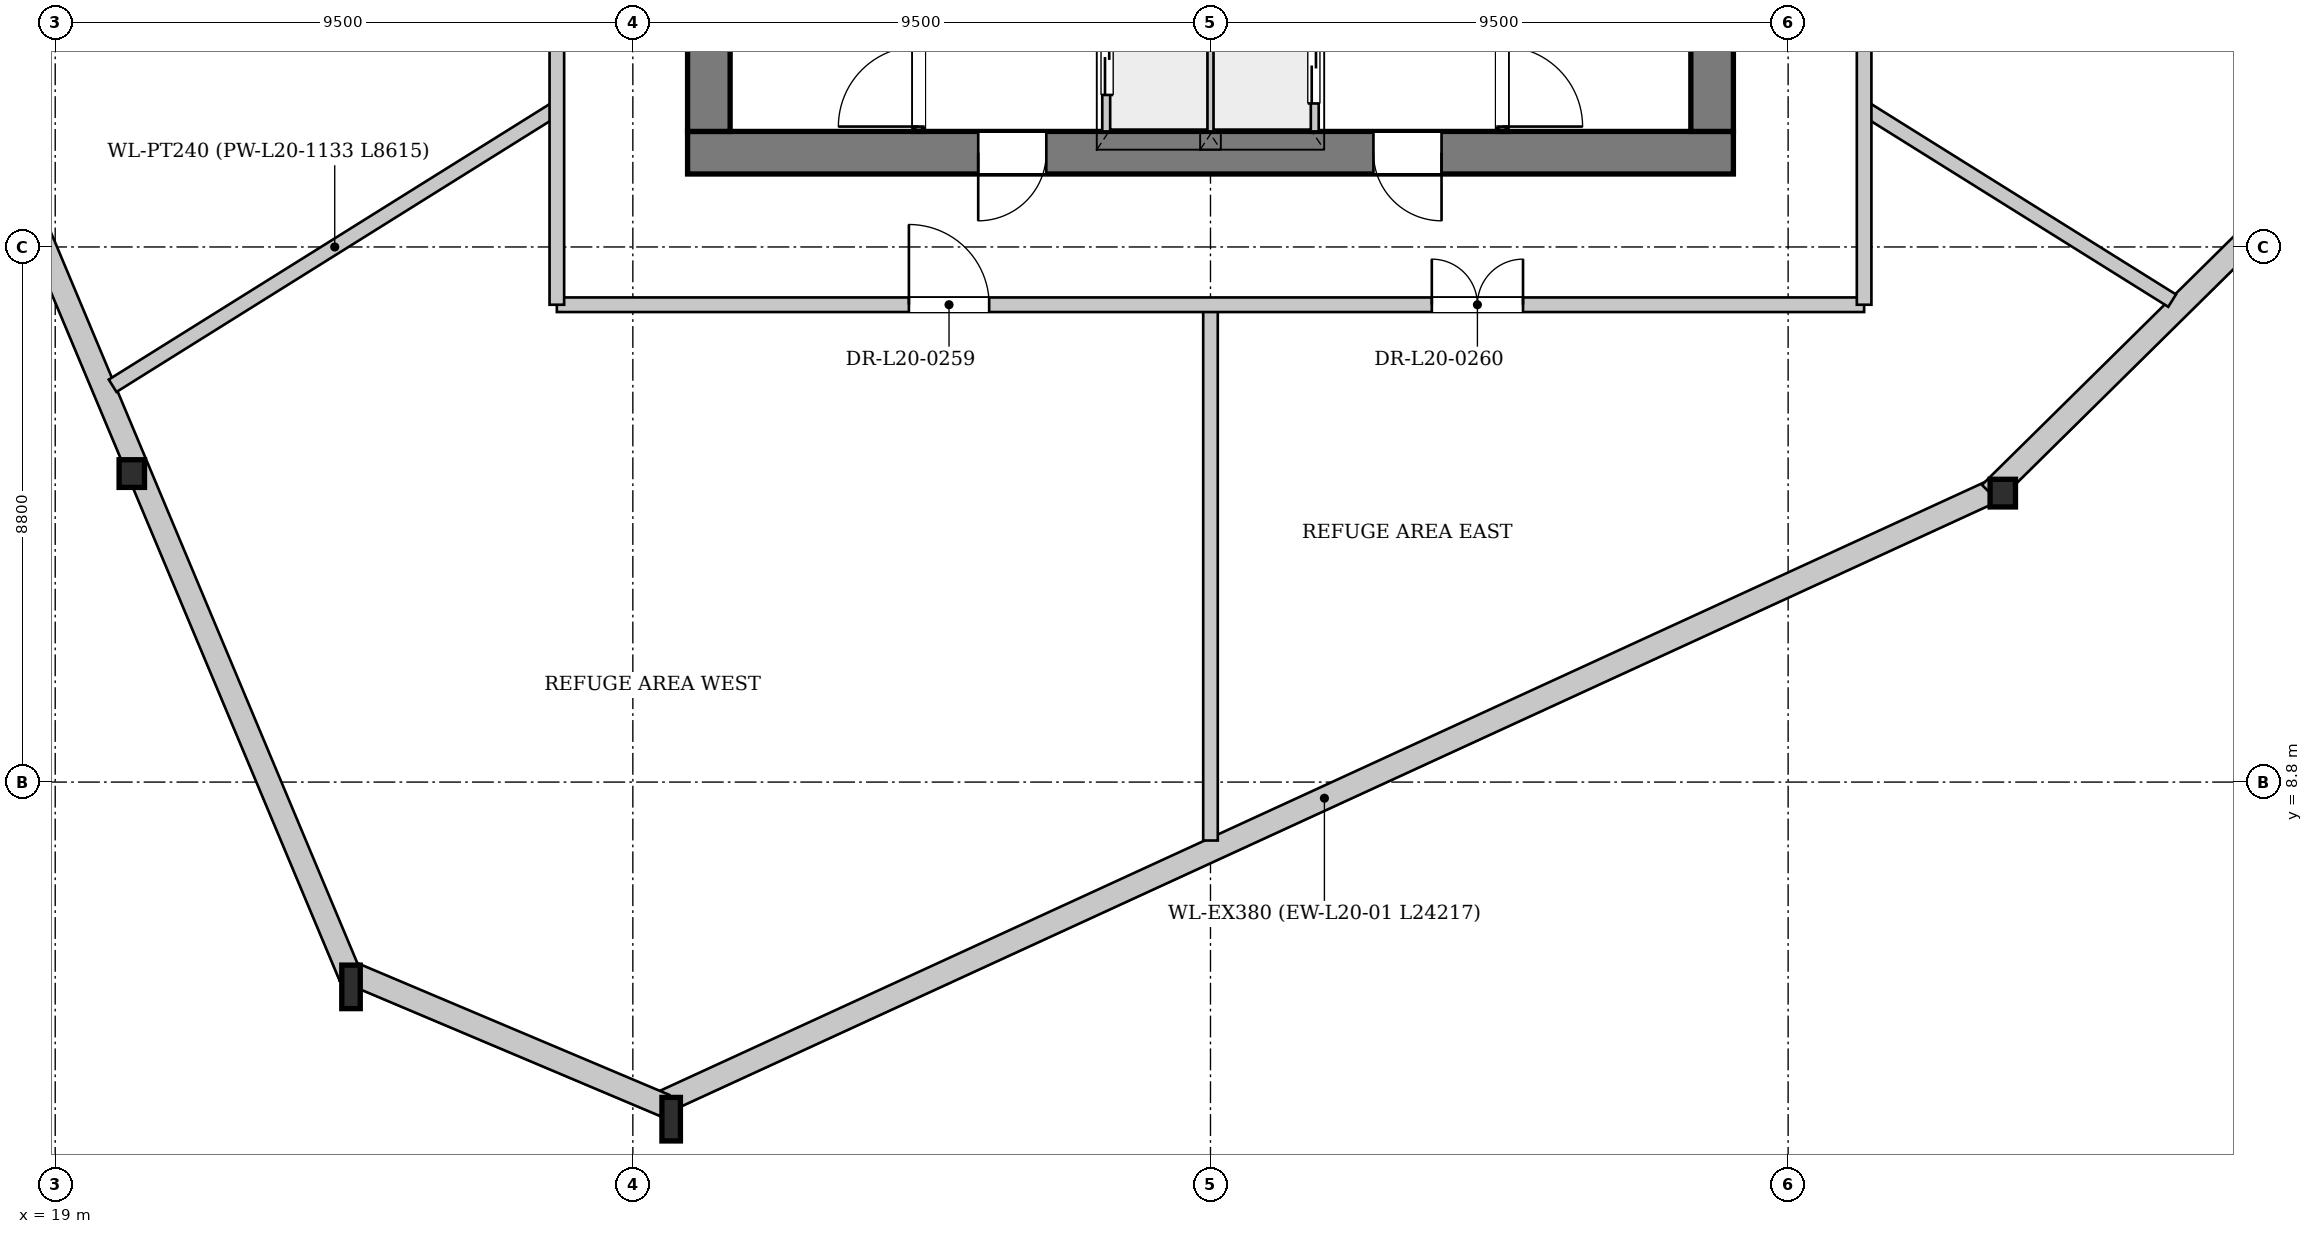
"""IFC4 building model, lengths in metres.
Left out: names, types, materials, properties, quantities, classifications, styles, units other than length and angle.
Written with IfcOpenShell. Run it as: python <this file> out.ifc"""

import sys

from ifc_helpers import new_model, si_unit, direction, frame, frame_2d, origin, origin_2d, place, context, subcontext, project, spatial, rectangle, i_section, extrude, source, transform, mapped, element, fill, save


model = new_model("IFC4")
c1 = context("Model", 3, precision=1e-05, world=origin(), true_north=direction((0.0, 1.0)))
c2 = subcontext(c1, "Body", "Model", "MODEL_VIEW")
j1 = project(units=[si_unit("LENGTHUNIT", "METRE"), si_unit("PLANEANGLEUNIT", "RADIAN")], contexts=[c1])
p1 = place(None, origin())
s1 = spatial("IfcSite", under=j1, at=p1, CompositionType="ELEMENT")
p2 = place(p1, origin())
s2 = spatial("IfcBuilding", under=s1, at=p2, CompositionType="ELEMENT")
p3 = place(p2, frame((0.0, 0.0, 79.9)))
s3 = spatial("IfcBuildingStorey", under=s2, at=p3, CompositionType="ELEMENT", Elevation=79.9)
m1 = source(origin(), c2, "Body", "SweptSolid", [
    extrude(i_section(OverallWidth=0.418, OverallDepth=0.455, WebThickness=0.038, FlangeThickness=0.059, at=origin_2d()), origin(), (0.0, 0.0, 1.0), 4.351),
])
p4 = place(p3, frame((20.126, 14.004, 0.0), z_axis=(0.061270817666, -0.059868097481, 0.996324092756), x_axis=(0.698872032261, 0.715246728425, 0.0)))
e1 = element("IfcColumn", 1, at=p4, inside=s3, PredefinedType="COLUMN", context=c2, shape_type="MappedRepresentation", body=[
    mapped(m1, transform((0.0, 0.0, 0.0), x_axis=(1.0, 0.0, 0.0), y_axis=(0.0, 1.0, 0.0), z_axis=(0.0, 0.0, 1.0), scale=1.0)),
])
m2 = source(origin(), c2, "Body", "SweptSolid", [
    extrude(i_section(OverallWidth=0.304, OverallDepth=0.716, WebThickness=0.021, FlangeThickness=0.04, at=origin_2d()), origin(), (0.0, 0.0, 1.0), 4.356),
])
p5 = place(p3, frame((23.678, 5.534, 0.0), z_axis=(0.085807381711, -0.046630791367, 0.995219906624), x_axis=(0.477484426277, 0.878640212296, 0.0)))
e2 = element("IfcColumn", 2, at=p5, inside=s3, PredefinedType="COLUMN", context=c2, shape_type="MappedRepresentation", body=[
    mapped(m2, transform((0.0, 0.0, 0.0), x_axis=(1.0, 0.0, 0.0), y_axis=(0.0, 1.0, 0.0), z_axis=(0.0, 0.0, 1.0), scale=1.0)),
])
m3 = source(origin(), c2, "Body", "SweptSolid", [
    extrude(i_section(OverallWidth=0.304, OverallDepth=0.716, WebThickness=0.021, FlangeThickness=0.04, at=origin_2d()), origin(), (0.0, 0.0, 1.0), 4.351),
])
p6 = place(p3, frame((28.95, 3.307, 0.0), z_axis=(0.082869842414, -0.023228242897, 0.996289635573), x_axis=(0.269895907344, 0.962889505187, 0.0)))
e3 = element("IfcColumn", 3, at=p6, inside=s3, PredefinedType="COLUMN", context=c2, shape_type="MappedRepresentation", body=[
    mapped(m3, transform((0.0, 0.0, 0.0), x_axis=(1.0, 0.0, 0.0), y_axis=(0.0, 1.0, 0.0), z_axis=(0.0, 0.0, 1.0), scale=1.0)),
])
m4 = source(origin(), c2, "Body", "SweptSolid", [
    extrude(i_section(OverallWidth=0.418, OverallDepth=0.455, WebThickness=0.038, FlangeThickness=0.059, at=origin_2d()), origin(), (0.0, 0.0, 1.0), 4.346),
])
p7 = place(p3, frame((50.956, 13.417, 0.0), z_axis=(0.034378288577, 0.062128083604, 0.997475931791), x_axis=(-0.874976999034, 0.484164487712, 0.0)))
e4 = element("IfcColumn", 4, at=p7, inside=s3, PredefinedType="COLUMN", context=c2, shape_type="MappedRepresentation", body=[
    mapped(m4, transform((0.0, 0.0, 0.0), x_axis=(1.0, 0.0, 0.0), y_axis=(0.0, 1.0, 0.0), z_axis=(0.0, 0.0, 1.0), scale=1.0)),
])
p8 = place(p3, frame((50.876, 13.59, 0.0), z_axis=(0.0, 0.0, 1.0), x_axis=(-0.908687697163, -0.417476549072, 0.0)))
e5 = element("IfcWall", 5, at=p8, inside=s3, PredefinedType="SOLIDWALL", context=c2, shape_type="SweptSolid", body=[
    extrude(rectangle(XDim=24.217, YDim=0.38, at=frame_2d((12.109, 0.0))), origin(), (0.0, 0.0, 1.0), 3.642),
])
p9 = place(p3, frame((29.024, 3.482, 0.0), z_axis=(0.0, 0.0, 1.0), x_axis=(-0.921180248129, 0.389136159277, 0.0)))
e6 = element("IfcWall", 6, at=p9, inside=s3, PredefinedType="SOLIDWALL", context=c2, shape_type="SweptSolid", body=[
    extrude(rectangle(XDim=5.723, YDim=0.38, at=frame_2d((2.862, 0.0))), origin(), (0.0, 0.0, 1.0), 3.642),
])
p10 = place(p3, frame((23.853, 5.607, 0.0), z_axis=(0.0, 0.0, 1.0), x_axis=(-0.386717925578, 0.922198051417, 0.0)))
e7 = element("IfcWall", 7, at=p10, inside=s3, PredefinedType="SOLIDWALL", context=c2, shape_type="SweptSolid", body=[
    extrude(rectangle(XDim=18.369, YDim=0.38, at=frame_2d((9.185, 0.0))), origin(), (0.0, 0.0, 1.0), 3.642),
])
p11 = place(p3, frame((68.059, 30.563, 0.0), z_axis=(0.0, 0.0, 1.0), x_axis=(-0.711738982303, -0.70244403412, 0.0)))
e8 = element("IfcWall", 8, at=p11, inside=s3, PredefinedType="SOLIDWALL", context=c2, shape_type="SweptSolid", body=[
    extrude(rectangle(XDim=24.217, YDim=0.38, at=frame_2d((12.109, 0.0))), origin(), (0.0, 0.0, 1.0), 3.642),
])
p12 = place(p3, frame((46.6, 19.15, 0.0), z_axis=(0.0, 0.0, 1.0), x_axis=(-1.0, 0.0, 0.0)))
e9 = element("IfcWall", 9, at=p12, inside=s3, PredefinedType="SHEAR", context=c2, shape_type="SweptSolid", body=[
    extrude(rectangle(XDim=17.2, YDim=0.7, at=frame_2d((8.6, 0.0))), origin(), (0.0, 0.0, 1.0), 4.25),
])
p13 = place(p12, frame((4.8, 0.0, 0.0)))
e10 = element("IfcOpeningElement", 10, at=p13, cuts=e9, PredefinedType="OPENING", context=c2, shape_type="SweptSolid", body=[
    extrude(rectangle(XDim=1.12, YDim=2.25, at=frame_2d((0.56, 1.125))), frame((0.0, 0.36, 0.0), z_axis=(0.0, -1.0, 0.0), x_axis=(1.0, 0.0, 0.0)), (0.0, 0.0, 1.0), 0.72),
])
p14 = place(p12, frame((11.3, 0.0, 0.0)))
e11 = element("IfcOpeningElement", 11, at=p14, cuts=e9, PredefinedType="OPENING", context=c2, shape_type="SweptSolid", body=[
    extrude(rectangle(XDim=1.12, YDim=2.25, at=frame_2d((0.56, 1.125))), frame((0.0, 0.36, 0.0), z_axis=(0.0, -1.0, 0.0), x_axis=(1.0, 0.0, 0.0)), (0.0, 0.0, 1.0), 0.72),
])
p15 = place(p3, frame((29.75, 19.5, 0.0), z_axis=(0.0, 0.0, 1.0), x_axis=(0.0, 1.0, 0.0)))
e12 = element("IfcWall", 12, at=p15, inside=s3, PredefinedType="SHEAR", context=c2, shape_type="SweptSolid", body=[
    extrude(rectangle(XDim=14.2, YDim=0.7, at=frame_2d((7.1, 0.0))), origin(), (0.0, 0.0, 1.0), 4.25),
])
p16 = place(p15, frame((7.42, 0.0, 0.0)))
e13 = element("IfcOpeningElement", 13, at=p16, cuts=e12, PredefinedType="OPENING", context=c2, shape_type="SweptSolid", body=[
    extrude(rectangle(XDim=1.6, YDim=2.2, at=frame_2d((0.8, 1.1))), frame((0.0, 0.36, 0.0), z_axis=(0.0, -1.0, 0.0), x_axis=(1.0, 0.0, 0.0)), (0.0, 0.0, 1.0), 0.72),
])
p17 = place(p3, frame((46.25, 33.7, 0.0), z_axis=(0.0, 0.0, 1.0), x_axis=(0.0, -1.0, 0.0)))
e14 = element("IfcWall", 14, at=p17, inside=s3, PredefinedType="SHEAR", context=c2, shape_type="SweptSolid", body=[
    extrude(rectangle(XDim=14.2, YDim=0.7, at=frame_2d((7.1, 0.0))), origin(), (0.0, 0.0, 1.0), 4.25),
])
p18 = place(p17, frame((5.18, 0.0, 0.0)))
e15 = element("IfcOpeningElement", 15, at=p18, cuts=e14, PredefinedType="OPENING", context=c2, shape_type="SweptSolid", body=[
    extrude(rectangle(XDim=1.6, YDim=2.2, at=frame_2d((0.8, 1.1))), frame((0.0, 0.36, 0.0), z_axis=(0.0, -1.0, 0.0), x_axis=(1.0, 0.0, 0.0)), (0.0, 0.0, 1.0), 0.72),
])
p19 = place(p3, frame((33.2, 19.5, 0.0), z_axis=(0.0, 0.0, 1.0), x_axis=(0.0, 1.0, 0.0)))
e16 = element("IfcWall", 16, at=p19, inside=s3, PredefinedType="PARTITIONING", context=c2, shape_type="SweptSolid", body=[
    extrude(rectangle(XDim=7.46, YDim=0.16, at=frame_2d((3.73, 0.0))), origin(), (0.0, 0.0, 1.0), 4.25),
])
p20 = place(p19, frame((0.08, 0.0, 0.0)))
e17 = element("IfcOpeningElement", 17, at=p20, cuts=e16, PredefinedType="OPENING", context=c2, shape_type="SweptSolid", body=[
    extrude(rectangle(XDim=1.32, YDim=2.2, at=frame_2d((0.66, 1.1))), frame((0.0, 0.09, 0.0), z_axis=(0.0, -1.0, 0.0), x_axis=(1.0, 0.0, 0.0)), (0.0, 0.0, 1.0), 0.18),
])
p21 = place(p3, frame((42.8, 26.96, 0.0), z_axis=(0.0, 0.0, 1.0), x_axis=(0.0, -1.0, 0.0)))
e18 = element("IfcWall", 18, at=p21, inside=s3, PredefinedType="PARTITIONING", context=c2, shape_type="SweptSolid", body=[
    extrude(rectangle(XDim=7.46, YDim=0.16, at=frame_2d((3.73, 0.0))), origin(), (0.0, 0.0, 1.0), 4.25),
])
p22 = place(p21, frame((6.06, 0.0, 0.0)))
e19 = element("IfcOpeningElement", 19, at=p22, cuts=e18, PredefinedType="OPENING", context=c2, shape_type="SweptSolid", body=[
    extrude(rectangle(XDim=1.32, YDim=2.2, at=frame_2d((0.66, 1.1))), frame((0.0, 0.09, 0.0), z_axis=(0.0, -1.0, 0.0), x_axis=(1.0, 0.0, 0.0)), (0.0, 0.0, 1.0), 0.18),
])
p23 = place(p3, frame((36.3, 19.5, 0.0), z_axis=(0.0, 0.0, 1.0), x_axis=(0.0, 1.0, 0.0)))
e20 = element("IfcWall", 20, at=p23, inside=s3, PredefinedType="PARTITIONING", context=c2, shape_type="SweptSolid", body=[
    extrude(rectangle(XDim=4.78, YDim=0.16, at=frame_2d((2.39, 0.0))), origin(), (0.0, 0.0, 1.0), 4.25),
])
p24 = place(p23, frame((0.6, 0.0, 0.0)))
e21 = element("IfcOpeningElement", 21, at=p24, cuts=e20, PredefinedType="OPENING", context=c2, shape_type="SweptSolid", body=[
    extrude(rectangle(XDim=1.2, YDim=2.2, at=frame_2d((0.6, 1.1))), frame((0.0, 0.09, 0.0), z_axis=(0.0, -1.0, 0.0), x_axis=(1.0, 0.0, 0.0)), (0.0, 0.0, 1.0), 0.18),
])
p25 = place(p23, frame((2.65, 0.0, 0.0)))
e22 = element("IfcOpeningElement", 22, at=p25, cuts=e20, PredefinedType="OPENING", context=c2, shape_type="SweptSolid", body=[
    extrude(rectangle(XDim=0.95, YDim=2.1, at=frame_2d((0.475, 1.05))), frame((0.0, 0.09, 0.0), z_axis=(0.0, -1.0, 0.0), x_axis=(1.0, 0.0, 0.0)), (0.0, 0.0, 1.0), 0.18),
])
p26 = place(p3, frame((39.7, 24.28, 0.0), z_axis=(0.0, 0.0, 1.0), x_axis=(0.0, -1.0, 0.0)))
e23 = element("IfcWall", 23, at=p26, inside=s3, PredefinedType="PARTITIONING", context=c2, shape_type="SweptSolid", body=[
    extrude(rectangle(XDim=4.78, YDim=0.16, at=frame_2d((2.39, 0.0))), origin(), (0.0, 0.0, 1.0), 4.25),
])
p27 = place(p26, frame((3.12, 0.0, 0.0)))
e24 = element("IfcOpeningElement", 24, at=p27, cuts=e23, PredefinedType="OPENING", context=c2, shape_type="SweptSolid", body=[
    extrude(rectangle(XDim=1.2, YDim=2.2, at=frame_2d((0.6, 1.1))), frame((0.0, 0.09, 0.0), z_axis=(0.0, -1.0, 0.0), x_axis=(1.0, 0.0, 0.0)), (0.0, 0.0, 1.0), 0.18),
])
p28 = place(p3, frame((38.0, 19.5, 0.0), z_axis=(0.0, 0.0, 1.0), x_axis=(0.0, 1.0, 0.0)))
e25 = element("IfcWall", 25, at=p28, inside=s3, PredefinedType="PARTITIONING", context=c2, shape_type="SweptSolid", body=[
    extrude(rectangle(XDim=2.46, YDim=0.125, at=frame_2d((1.23, 0.0))), origin(), (0.0, 0.0, 1.0), 4.25),
])
p29 = place(p3, frame((27.25, 19.883, 0.0), z_axis=(0.0, 0.0, 1.0), x_axis=(-0.848038103276, -0.529935255849, 0.0)))
e26 = element("IfcWall", 26, at=p29, inside=s3, PredefinedType="PARTITIONING", context=c2, shape_type="SweptSolid", body=[
    extrude(rectangle(XDim=8.615, YDim=0.24, at=frame_2d((4.308, 0.0))), origin(), (0.0, 0.0, 1.0), 4.25),
])
p30 = place(p3, frame((38.0, 16.65, 0.0), z_axis=(0.0, 0.0, 1.0), x_axis=(0.0, -1.0, 0.0)))
e27 = element("IfcWall", 27, at=p30, inside=s3, PredefinedType="PARTITIONING", context=c2, shape_type="SweptSolid", body=[
    extrude(rectangle(XDim=8.811, YDim=0.24, at=frame_2d((4.406, 0.0))), origin(), (0.0, 0.0, 1.0), 4.25),
])
p31 = place(p3, frame((48.75, 19.883, 0.0), z_axis=(0.0, 0.0, 1.0), x_axis=(0.848037336034, -0.529936483639, 0.0)))
e28 = element("IfcWall", 28, at=p31, inside=s3, PredefinedType="PARTITIONING", context=c2, shape_type="SweptSolid", body=[
    extrude(rectangle(XDim=5.973, YDim=0.24, at=frame_2d((2.987, 0.0))), origin(), (0.0, 0.0, 1.0), 4.25),
])
p32 = place(p3, frame((27.25, 16.65, 0.0), z_axis=(0.0, 0.0, 1.0), x_axis=(1.0, 0.0, 0.0)))
e29 = element("IfcWall", 29, at=p32, inside=s3, PredefinedType="PARTITIONING", context=c2, shape_type="SweptSolid", body=[
    extrude(rectangle(XDim=21.5, YDim=0.24, at=frame_2d((10.75, 0.0))), origin(), (0.0, 0.0, 1.0), 4.25),
])
p33 = place(p32, frame((5.79, 0.0, 0.0)))
e30 = element("IfcOpeningElement", 30, at=p33, cuts=e29, PredefinedType="OPENING", context=c2, shape_type="SweptSolid", body=[
    extrude(rectangle(XDim=1.32, YDim=2.2, at=frame_2d((0.66, 1.1))), frame((0.0, 0.13, 0.0), z_axis=(0.0, -1.0, 0.0), x_axis=(1.0, 0.0, 0.0)), (0.0, 0.0, 1.0), 0.26),
])
p34 = place(p32, frame((14.39, 0.0, 0.0)))
e31 = element("IfcOpeningElement", 31, at=p34, cuts=e29, PredefinedType="OPENING", context=c2, shape_type="SweptSolid", body=[
    extrude(rectangle(XDim=1.5, YDim=2.25, at=frame_2d((0.75, 1.125))), frame((0.0, 0.13, 0.0), z_axis=(0.0, -1.0, 0.0), x_axis=(1.0, 0.0, 0.0)), (0.0, 0.0, 1.0), 0.26),
])
p35 = place(p3, frame((27.25, 16.65, 0.0), z_axis=(0.0, 0.0, 1.0), x_axis=(0.0, 1.0, 0.0)))
e32 = element("IfcWall", 32, at=p35, inside=s3, PredefinedType="PARTITIONING", context=c2, shape_type="SweptSolid", body=[
    extrude(rectangle(XDim=19.9, YDim=0.24, at=frame_2d((9.95, 0.0))), origin(), (0.0, 0.0, 1.0), 4.25),
])
p36 = place(p35, frame((5.22, 0.0, 0.0)))
e33 = element("IfcOpeningElement", 33, at=p36, cuts=e32, PredefinedType="OPENING", context=c2, shape_type="SweptSolid", body=[
    extrude(rectangle(XDim=1.5, YDim=2.25, at=frame_2d((0.75, 1.125))), frame((0.0, 0.13, 0.0), z_axis=(0.0, -1.0, 0.0), x_axis=(1.0, 0.0, 0.0)), (0.0, 0.0, 1.0), 0.26),
])
p37 = place(p35, frame((14.78, 0.0, 0.0)))
e34 = element("IfcOpeningElement", 34, at=p37, cuts=e32, PredefinedType="OPENING", context=c2, shape_type="SweptSolid", body=[
    extrude(rectangle(XDim=1.5, YDim=2.25, at=frame_2d((0.75, 1.125))), frame((0.0, 0.13, 0.0), z_axis=(0.0, -1.0, 0.0), x_axis=(1.0, 0.0, 0.0)), (0.0, 0.0, 1.0), 0.26),
])
p38 = place(p3, frame((48.75, 16.65, 0.0), z_axis=(0.0, 0.0, 1.0), x_axis=(0.0, 1.0, 0.0)))
e35 = element("IfcWall", 35, at=p38, inside=s3, PredefinedType="PARTITIONING", context=c2, shape_type="SweptSolid", body=[
    extrude(rectangle(XDim=19.9, YDim=0.24, at=frame_2d((9.95, 0.0))), origin(), (0.0, 0.0, 1.0), 4.25),
])
p39 = place(p38, frame((5.22, 0.0, 0.0)))
e36 = element("IfcOpeningElement", 36, at=p39, cuts=e35, PredefinedType="OPENING", context=c2, shape_type="SweptSolid", body=[
    extrude(rectangle(XDim=1.5, YDim=2.25, at=frame_2d((0.75, 1.125))), frame((0.0, 0.13, 0.0), z_axis=(0.0, -1.0, 0.0), x_axis=(1.0, 0.0, 0.0)), (0.0, 0.0, 1.0), 0.26),
])
p40 = place(p38, frame((13.18, 0.0, 0.0)))
e37 = element("IfcOpeningElement", 37, at=p40, cuts=e35, PredefinedType="OPENING", context=c2, shape_type="SweptSolid", body=[
    extrude(rectangle(XDim=1.5, YDim=2.25, at=frame_2d((0.75, 1.125))), frame((0.0, 0.13, 0.0), z_axis=(0.0, -1.0, 0.0), x_axis=(1.0, 0.0, 0.0)), (0.0, 0.0, 1.0), 0.26),
])
m5 = source(origin(), c2, "Body", "SweptSolid", [
    extrude(rectangle(XDim=1.12, YDim=2.25, at=frame_2d((0.56, 1.125))), frame((0.0, 0.025, 0.0), z_axis=(0.0, -1.0, 0.0), x_axis=(1.0, 0.0, 0.0)), (0.0, 0.0, 1.0), 0.05),
])
p41 = place(p13, origin())
e38 = element("IfcDoor", 38, at=p41, inside=s3, OperationType="SINGLE_SWING_LEFT", PredefinedType="DOOR", context=c2, shape_type="MappedRepresentation", body=[
    mapped(m5, transform((0.0, 0.0, 0.0), x_axis=(1.0, 0.0, 0.0), y_axis=(0.0, 1.0, 0.0), z_axis=(0.0, 0.0, 1.0), scale=1.0)),
])
fill(e10, e38)
p42 = place(p14, origin())
e39 = element("IfcDoor", 39, at=p42, inside=s3, OperationType="SINGLE_SWING_RIGHT", PredefinedType="DOOR", context=c2, shape_type="MappedRepresentation", body=[
    mapped(m5, transform((0.0, 0.0, 0.0), x_axis=(1.0, 0.0, 0.0), y_axis=(0.0, 1.0, 0.0), z_axis=(0.0, 0.0, 1.0), scale=1.0)),
])
fill(e11, e39)
m6 = source(origin(), c2, "Body", "SweptSolid", [
    extrude(rectangle(XDim=1.32, YDim=2.2, at=frame_2d((0.66, 1.1))), frame((0.0, 0.025, 0.0), z_axis=(0.0, -1.0, 0.0), x_axis=(1.0, 0.0, 0.0)), (0.0, 0.0, 1.0), 0.05),
])
p43 = place(p20, origin())
e40 = element("IfcDoor", 40, at=p43, inside=s3, OperationType="SINGLE_SWING_LEFT", PredefinedType="DOOR", context=c2, shape_type="MappedRepresentation", body=[
    mapped(m6, transform((0.0, 0.0, 0.0), x_axis=(1.0, 0.0, 0.0), y_axis=(0.0, 1.0, 0.0), z_axis=(0.0, 0.0, 1.0), scale=1.0)),
])
fill(e17, e40)
p44 = place(p22, origin())
e41 = element("IfcDoor", 41, at=p44, inside=s3, OperationType="SINGLE_SWING_RIGHT", PredefinedType="DOOR", context=c2, shape_type="MappedRepresentation", body=[
    mapped(m6, transform((0.0, 0.0, 0.0), x_axis=(1.0, 0.0, 0.0), y_axis=(0.0, 1.0, 0.0), z_axis=(0.0, 0.0, 1.0), scale=1.0)),
])
fill(e19, e41)
m7 = source(origin(), c2, "Body", "SweptSolid", [
    extrude(rectangle(XDim=1.2, YDim=2.2, at=frame_2d((0.6, 1.1))), frame((0.0, 0.025, 0.0), z_axis=(0.0, -1.0, 0.0), x_axis=(1.0, 0.0, 0.0)), (0.0, 0.0, 1.0), 0.05),
])
p45 = place(p24, origin())
e42 = element("IfcDoor", 42, at=p45, inside=s3, OperationType="DOUBLE_DOOR_SLIDING", PredefinedType="DOOR", context=c2, shape_type="MappedRepresentation", body=[
    mapped(m7, transform((0.0, 0.0, 0.0), x_axis=(1.0, 0.0, 0.0), y_axis=(0.0, 1.0, 0.0), z_axis=(0.0, 0.0, 1.0), scale=1.0)),
])
fill(e21, e42)
p46 = place(p27, origin())
e43 = element("IfcDoor", 43, at=p46, inside=s3, OperationType="DOUBLE_DOOR_SLIDING", PredefinedType="DOOR", context=c2, shape_type="MappedRepresentation", body=[
    mapped(m7, transform((0.0, 0.0, 0.0), x_axis=(1.0, 0.0, 0.0), y_axis=(0.0, 1.0, 0.0), z_axis=(0.0, 0.0, 1.0), scale=1.0)),
])
fill(e24, e43)
p47 = place(p33, origin())
e44 = element("IfcDoor", 44, at=p47, inside=s3, OperationType="SINGLE_SWING_LEFT", PredefinedType="DOOR", context=c2, shape_type="MappedRepresentation", body=[
    mapped(m6, transform((0.0, 0.0, 0.0), x_axis=(1.0, 0.0, 0.0), y_axis=(0.0, 1.0, 0.0), z_axis=(0.0, 0.0, 1.0), scale=1.0)),
])
fill(e30, e44)
m8 = source(origin(), c2, "Body", "SweptSolid", [
    extrude(rectangle(XDim=1.5, YDim=2.25, at=frame_2d((0.75, 1.125))), frame((0.0, 0.025, 0.0), z_axis=(0.0, -1.0, 0.0), x_axis=(1.0, 0.0, 0.0)), (0.0, 0.0, 1.0), 0.05),
])
p48 = place(p34, origin())
e45 = element("IfcDoor", 45, at=p48, inside=s3, OperationType="DOUBLE_DOOR_SINGLE_SWING", PredefinedType="DOOR", context=c2, shape_type="MappedRepresentation", body=[
    mapped(m8, transform((0.0, 0.0, 0.0), x_axis=(1.0, 0.0, 0.0), y_axis=(0.0, 1.0, 0.0), z_axis=(0.0, 0.0, 1.0), scale=1.0)),
])
fill(e31, e45)
save(model, sys.argv[1])
